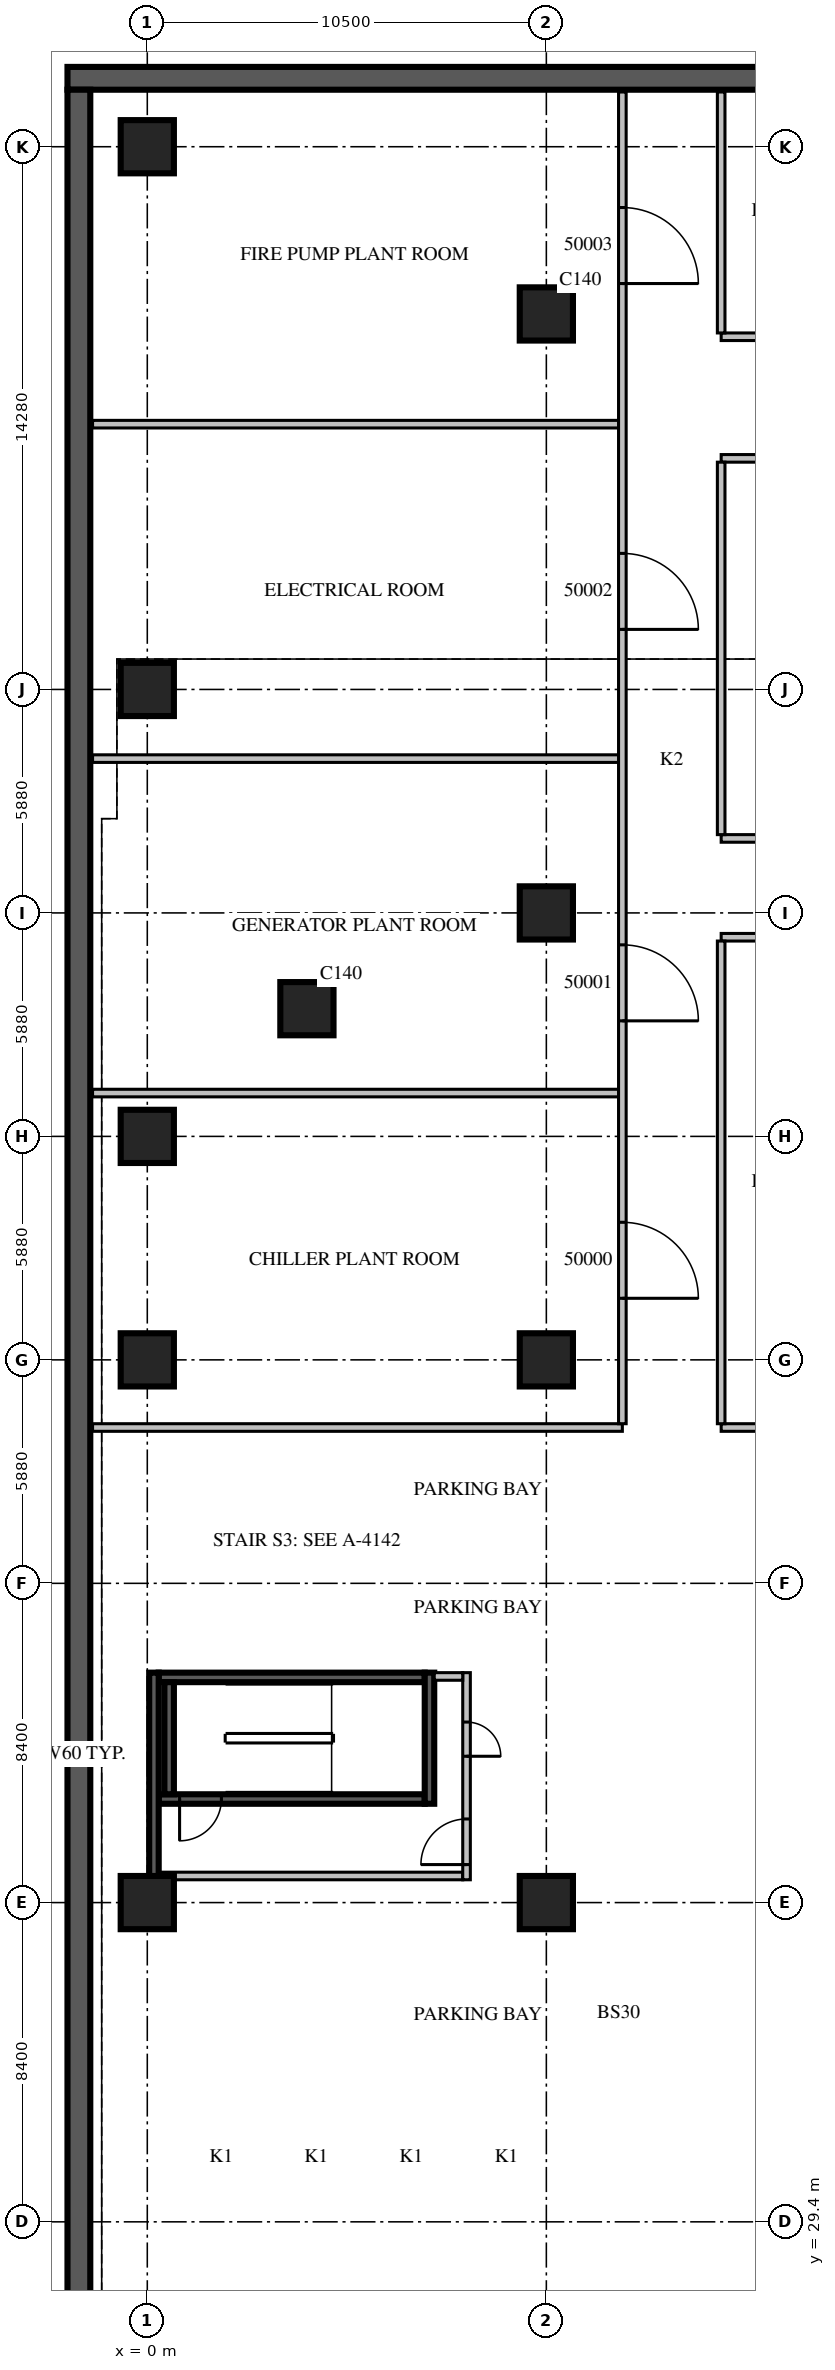
"""IFC4 building model, lengths in metres.
Left out: names, types, materials, properties, quantities, classifications, styles, units other than length and angle.
Written with IfcOpenShell. Run it as: python <this file> out.ifc"""

import sys

from ifc_helpers import new_model, si_unit, direction, frame, frame_2d, origin, origin_2d, place, context, subcontext, project, spatial, rectangle, extrude, source, transform, mapped, element, fill, save


model = new_model("IFC4")
c1 = context("Model", 3, precision=1e-05, world=origin(), true_north=direction((0.0, 1.0)))
c2 = subcontext(c1, "Body", "Model", "MODEL_VIEW")
j1 = project(units=[si_unit("LENGTHUNIT", "METRE"), si_unit("PLANEANGLEUNIT", "RADIAN")], contexts=[c1])
p1 = place(None, origin())
s1 = spatial("IfcSite", under=j1, at=p1, CompositionType="ELEMENT")
p2 = place(p1, origin())
s2 = spatial("IfcBuilding", under=s1, at=p2, CompositionType="ELEMENT")
p3 = place(p2, frame((0.0, 0.0, -13.5)))
s3 = spatial("IfcBuildingStorey", under=s2, at=p3, CompositionType="ELEMENT", Elevation=-13.5)
p4 = place(p3, frame((53.58, 85.8, 0.0), z_axis=(0.0, 0.0, 1.0), x_axis=(-1.0, 0.0, 0.0)))
e1 = element("IfcWall", 1, at=p4, inside=s3, PredefinedType="SOLIDWALL", context=c2, shape_type="SweptSolid", body=[
    extrude(rectangle(XDim=55.68, YDim=0.6, at=frame_2d((27.84, 0.0))), origin(), (0.0, 0.0, 1.0), 4.5),
])
p5 = place(p3, frame((-1.8, 85.5, 0.0), z_axis=(0.0, 0.0, 1.0), x_axis=(0.0, -1.0, 0.0)))
e2 = element("IfcWall", 2, at=p5, inside=s3, PredefinedType="SOLIDWALL", context=c2, shape_type="SweptSolid", body=[
    extrude(rectangle(XDim=87.6, YDim=0.6, at=frame_2d((43.8, 0.0))), origin(), (0.0, 0.0, 1.0), 4.5),
])
m1 = source(origin(), c2, "Body", "SweptSolid", [
    extrude(rectangle(XDim=1.4, YDim=1.4, at=origin_2d()), origin(), (0.0, 0.0, 1.0), 4.5),
])
for number, where, z_axis, x_axis in (
    (3, (0.0, 37.8, 0.0), (0.0, 0.0, 1.0), (1.0, 0.0, 0.0)),
    (4, (0.0, 52.08, 0.0), (0.0, 0.0, 1.0), (1.0, 0.0, 0.0)),
    (5, (0.0, 57.96, 0.0), (0.0, 0.0, 1.0), (1.0, 0.0, 0.0)),
    (6, (0.0, 69.72, 0.0), (0.0, 0.0, 1.0), (1.0, 0.0, 0.0)),
    (7, (0.0, 84.0, 0.0), (0.0, 0.0, 1.0), (1.0, 0.0, 0.0)),
    (8, (4.2, 61.32, 0.0), (0.0, 0.0, 1.0), (1.0, 0.0, 0.0)),
    (9, (10.5, 37.8, 0.0), (0.0, 0.0, 1.0), (1.0, 0.0, 0.0)),
    (10, (10.5, 52.08, 0.0), (0.0, 0.0, 1.0), (1.0, 0.0, 0.0)),
    (11, (10.5, 63.84, 0.0), (0.0, 0.0, 1.0), (1.0, 0.0, 0.0)),
    (12, (10.5, 79.6, 0.0), (0.0, 0.0, 1.0), (1.0, 0.0, 0.0)),
):
    element("IfcColumn", number, at=place(p3, frame(where, z_axis=z_axis, x_axis=x_axis)), inside=s3, PredefinedType="COLUMN", context=c2, shape_type="MappedRepresentation", body=[
        mapped(m1, transform((0.0, 0.0, 0.0), scale=1.0)),
    ])
m2 = source(origin(), c2, "Body", "SweptSolid", [
    extrude(rectangle(XDim=7.0, YDim=0.25, at=frame_2d((3.5, 0.0))), origin(), (0.0, 0.0, 1.0), 3.9),
])
p6 = place(p3, frame((0.3, 40.525, 0.0), z_axis=(0.0, 0.0, 1.0), x_axis=(1.0, 0.0, 0.0)))
e13 = element("IfcWall", 13, at=p6, inside=s3, PredefinedType="SOLIDWALL", context=c2, shape_type="MappedRepresentation", body=[
    mapped(m2, transform((0.0, 0.0, 0.0), scale=1.0)),
])
m3 = source(origin(), c2, "Body", "SweptSolid", [
    extrude(rectangle(XDim=1.1, YDim=2.1, at=frame_2d((0.55, 1.05))), frame((0.0, 0.135, 0.0), z_axis=(0.0, -1.0, 0.0), x_axis=(1.0, 0.0, 0.0)), (0.0, 0.0, 1.0), 0.27),
])
p7 = place(p6, frame((0.55, 0.0, 0.0)))
e14 = element("IfcOpeningElement", 14, at=p7, cuts=e13, PredefinedType="OPENING", context=c2, shape_type="MappedRepresentation", body=[
    mapped(m3, transform((0.0, 0.0, 0.0), scale=1.0)),
])
p8 = place(p3, frame((0.3, 43.725, 0.0), z_axis=(0.0, 0.0, 1.0), x_axis=(1.0, 0.0, 0.0)))
e15 = element("IfcWall", 15, at=p8, inside=s3, PredefinedType="SOLIDWALL", context=c2, shape_type="MappedRepresentation", body=[
    mapped(m2, transform((0.0, 0.0, 0.0), scale=1.0)),
])
m4 = source(origin(), c2, "Body", "SweptSolid", [
    extrude(rectangle(XDim=3.45, YDim=0.25, at=frame_2d((1.725, 0.0))), origin(), (0.0, 0.0, 1.0), 3.9),
])
p9 = place(p3, frame((7.425, 40.4, 0.0), z_axis=(0.0, 0.0, 1.0), x_axis=(0.0, 1.0, 0.0)))
e16 = element("IfcWall", 16, at=p9, inside=s3, PredefinedType="SOLIDWALL", context=c2, shape_type="MappedRepresentation", body=[
    mapped(m4, transform((0.0, 0.0, 0.0), scale=1.0)),
])
m5 = source(origin(), c2, "Body", "SweptSolid", [
    extrude(rectangle(XDim=2.95, YDim=0.25, at=frame_2d((1.475, 0.0))), origin(), (0.0, 0.0, 1.0), 3.9),
])
p10 = place(p3, frame((0.575, 40.65, 0.0), z_axis=(0.0, 0.0, 1.0), x_axis=(0.0, 1.0, 0.0)))
e17 = element("IfcWall", 17, at=p10, inside=s3, PredefinedType="SOLIDWALL", context=c2, shape_type="MappedRepresentation", body=[
    mapped(m5, transform((0.0, 0.0, 0.0), scale=1.0)),
])
m6 = source(origin(), c2, "Body", "SweptSolid", [
    extrude(rectangle(XDim=8.0, YDim=0.2, at=frame_2d((4.0, 0.0))), origin(), (0.0, 0.0, 1.0), 3.9),
])
p11 = place(p3, frame((0.3, 38.5, 0.0), z_axis=(0.0, 0.0, 1.0), x_axis=(1.0, 0.0, 0.0)))
e18 = element("IfcWall", 18, at=p11, inside=s3, PredefinedType="PARTITIONING", context=c2, shape_type="MappedRepresentation", body=[
    mapped(m6, transform((0.0, 0.0, 0.0), scale=1.0)),
])
m7 = source(origin(), c2, "Body", "SweptSolid", [
    extrude(rectangle(XDim=5.45, YDim=0.2, at=frame_2d((2.725, 0.0))), origin(), (0.0, 0.0, 1.0), 3.9),
])
p12 = place(p3, frame((8.4, 38.4, 0.0), z_axis=(0.0, 0.0, 1.0), x_axis=(0.0, 1.0, 0.0)))
e19 = element("IfcWall", 19, at=p12, inside=s3, PredefinedType="PARTITIONING", context=c2, shape_type="MappedRepresentation", body=[
    mapped(m7, transform((0.0, 0.0, 0.0), scale=1.0)),
])
m8 = source(origin(), c2, "Body", "SweptSolid", [
    extrude(rectangle(XDim=1.2, YDim=2.1, at=frame_2d((0.6, 1.05))), frame((0.0, 0.11, 0.0), z_axis=(0.0, -1.0, 0.0), x_axis=(1.0, 0.0, 0.0)), (0.0, 0.0, 1.0), 0.22),
])
p13 = place(p12, frame((0.4, 0.0, 0.0)))
e20 = element("IfcOpeningElement", 20, at=p13, cuts=e19, PredefinedType="OPENING", context=c2, shape_type="MappedRepresentation", body=[
    mapped(m8, transform((0.0, 0.0, 0.0), scale=1.0)),
])
m9 = source(origin(), c2, "Body", "SweptSolid", [
    extrude(rectangle(XDim=0.9, YDim=2.1, at=frame_2d((0.45, 1.05))), frame((0.0, 0.11, 0.0), z_axis=(0.0, -1.0, 0.0), x_axis=(1.0, 0.0, 0.0)), (0.0, 0.0, 1.0), 0.22),
])
p14 = place(p12, frame((3.25, 0.0, 0.0)))
e21 = element("IfcOpeningElement", 21, at=p14, cuts=e19, PredefinedType="OPENING", context=c2, shape_type="MappedRepresentation", body=[
    mapped(m9, transform((0.0, 0.0, 0.0), scale=1.0)),
])
m10 = source(origin(), c2, "Body", "SweptSolid", [
    extrude(rectangle(XDim=0.75, YDim=0.2, at=frame_2d((0.375, 0.0))), origin(), (0.0, 0.0, 1.0), 3.9),
])
p15 = place(p3, frame((7.55, 43.75, 0.0), z_axis=(0.0, 0.0, 1.0), x_axis=(1.0, 0.0, 0.0)))
e22 = element("IfcWall", 22, at=p15, inside=s3, PredefinedType="PARTITIONING", context=c2, shape_type="MappedRepresentation", body=[
    mapped(m10, transform((0.0, 0.0, 0.0), scale=1.0)),
])
m11 = source(origin(), c2, "Body", "SweptSolid", [
    extrude(rectangle(XDim=5.45, YDim=0.25, at=frame_2d((2.725, 0.0))), origin(), (0.0, 0.0, 1.0), 3.9),
])
p16 = place(p3, frame((0.175, 38.4, 0.0), z_axis=(0.0, 0.0, 1.0), x_axis=(0.0, 1.0, 0.0)))
e23 = element("IfcWall", 23, at=p16, inside=s3, PredefinedType="SOLIDWALL", context=c2, shape_type="MappedRepresentation", body=[
    mapped(m11, transform((0.0, 0.0, 0.0), scale=1.0)),
])
p17 = place(p3, frame((-1.44, 50.3, 0.0), z_axis=(0.0, 0.0, 1.0), x_axis=(1.0, 0.0, 0.0)))
e24 = element("IfcWall", 24, at=p17, inside=s3, PredefinedType="PARTITIONING", context=c2, shape_type="SweptSolid", body=[
    extrude(rectangle(XDim=13.94, YDim=0.2, at=frame_2d((6.97, 0.0))), origin(), (0.0, 0.0, 1.0), 3.9),
])
p18 = place(p3, frame((15.1, 50.3, 0.0), z_axis=(0.0, 0.0, 1.0), x_axis=(1.0, 0.0, 0.0)))
e25 = element("IfcWall", 25, at=p18, inside=s3, PredefinedType="PARTITIONING", context=c2, shape_type="SweptSolid", body=[
    extrude(rectangle(XDim=38.48, YDim=0.2, at=frame_2d((19.24, 0.0))), origin(), (0.0, 0.0, 1.0), 3.9),
])
m12 = source(origin(), c2, "Body", "SweptSolid", [
    extrude(rectangle(XDim=13.94, YDim=0.2, at=frame_2d((6.97, 0.0))), origin(), (0.0, 0.0, 1.0), 3.9),
])
p19 = place(p3, frame((-1.44, 59.1, 0.0), z_axis=(0.0, 0.0, 1.0), x_axis=(1.0, 0.0, 0.0)))
e26 = element("IfcWall", 26, at=p19, inside=s3, PredefinedType="PARTITIONING", context=c2, shape_type="MappedRepresentation", body=[
    mapped(m12, transform((0.0, 0.0, 0.0), scale=1.0)),
])
p20 = place(p3, frame((15.1, 63.2, 0.0), z_axis=(0.0, 0.0, 1.0), x_axis=(1.0, 0.0, 0.0)))
e27 = element("IfcWall", 27, at=p20, inside=s3, PredefinedType="PARTITIONING", context=c2, shape_type="SweptSolid", body=[
    extrude(rectangle(XDim=38.42, YDim=0.2, at=frame_2d((19.21, 0.0))), origin(), (0.0, 0.0, 1.0), 3.9),
])
p21 = place(p20, frame((3.2, 0.0, 0.0)))
e28 = element("IfcOpeningElement", 28, at=p21, cuts=e27, PredefinedType="OPENING", context=c2, shape_type="MappedRepresentation", body=[
    mapped(m8, transform((0.0, 0.0, 0.0), scale=1.0)),
])
m13 = source(origin(), c2, "Body", "SweptSolid", [
    extrude(rectangle(XDim=2.0, YDim=2.1, at=frame_2d((1.0, 1.05))), frame((0.0, 0.11, 0.0), z_axis=(0.0, -1.0, 0.0), x_axis=(1.0, 0.0, 0.0)), (0.0, 0.0, 1.0), 0.22),
])
p22 = place(p20, frame((10.5, 0.0, 0.0)))
e29 = element("IfcOpeningElement", 29, at=p22, cuts=e27, PredefinedType="OPENING", context=c2, shape_type="MappedRepresentation", body=[
    mapped(m13, transform((0.0, 0.0, 0.0), scale=1.0)),
])
p23 = place(p20, frame((18.6, 0.0, 0.0)))
e30 = element("IfcOpeningElement", 30, at=p23, cuts=e27, PredefinedType="OPENING", context=c2, shape_type="MappedRepresentation", body=[
    mapped(m13, transform((0.0, 0.0, 0.0), scale=1.0)),
])
p24 = place(p20, frame((26.7, 0.0, 0.0)))
e31 = element("IfcOpeningElement", 31, at=p24, cuts=e27, PredefinedType="OPENING", context=c2, shape_type="MappedRepresentation", body=[
    mapped(m13, transform((0.0, 0.0, 0.0), scale=1.0)),
])
p25 = place(p20, frame((34.4, 0.0, 0.0)))
e32 = element("IfcOpeningElement", 32, at=p25, cuts=e27, PredefinedType="OPENING", context=c2, shape_type="MappedRepresentation", body=[
    mapped(m8, transform((0.0, 0.0, 0.0), scale=1.0)),
])
m14 = source(origin(), c2, "Body", "SweptSolid", [
    extrude(rectangle(XDim=38.42, YDim=0.2, at=frame_2d((19.21, 0.0))), origin(), (0.0, 0.0, 1.0), 3.9),
])
p26 = place(p3, frame((15.1, 65.8, 0.0), z_axis=(0.0, 0.0, 1.0), x_axis=(1.0, 0.0, 0.0)))
e33 = element("IfcWall", 33, at=p26, inside=s3, PredefinedType="PARTITIONING", context=c2, shape_type="MappedRepresentation", body=[
    mapped(m14, transform((0.0, 0.0, 0.0), scale=1.0)),
])
p27 = place(p26, frame((3.2, 0.0, 0.0)))
e34 = element("IfcOpeningElement", 34, at=p27, cuts=e33, PredefinedType="OPENING", context=c2, shape_type="MappedRepresentation", body=[
    mapped(m8, transform((0.0, 0.0, 0.0), scale=1.0)),
])
p28 = place(p26, frame((10.9, 0.0, 0.0)))
e35 = element("IfcOpeningElement", 35, at=p28, cuts=e33, PredefinedType="OPENING", context=c2, shape_type="MappedRepresentation", body=[
    mapped(m8, transform((0.0, 0.0, 0.0), scale=1.0)),
])
p29 = place(p26, frame((19.0, 0.0, 0.0)))
e36 = element("IfcOpeningElement", 36, at=p29, cuts=e33, PredefinedType="OPENING", context=c2, shape_type="MappedRepresentation", body=[
    mapped(m8, transform((0.0, 0.0, 0.0), scale=1.0)),
])
p30 = place(p26, frame((26.7, 0.0, 0.0)))
e37 = element("IfcOpeningElement", 37, at=p30, cuts=e33, PredefinedType="OPENING", context=c2, shape_type="MappedRepresentation", body=[
    mapped(m8, transform((0.0, 0.0, 0.0), scale=1.0)),
])
p31 = place(p26, frame((34.0, 0.0, 0.0)))
e38 = element("IfcOpeningElement", 38, at=p31, cuts=e33, PredefinedType="OPENING", context=c2, shape_type="MappedRepresentation", body=[
    mapped(m8, transform((0.0, 0.0, 0.0), scale=1.0)),
])
p32 = place(p3, frame((-1.44, 67.9, 0.0), z_axis=(0.0, 0.0, 1.0), x_axis=(1.0, 0.0, 0.0)))
e39 = element("IfcWall", 39, at=p32, inside=s3, PredefinedType="PARTITIONING", context=c2, shape_type="MappedRepresentation", body=[
    mapped(m12, transform((0.0, 0.0, 0.0), scale=1.0)),
])
p33 = place(p3, frame((15.1, 75.8, 0.0), z_axis=(0.0, 0.0, 1.0), x_axis=(1.0, 0.0, 0.0)))
e40 = element("IfcWall", 40, at=p33, inside=s3, PredefinedType="PARTITIONING", context=c2, shape_type="MappedRepresentation", body=[
    mapped(m14, transform((0.0, 0.0, 0.0), scale=1.0)),
])
p34 = place(p3, frame((-1.44, 76.7, 0.0), z_axis=(0.0, 0.0, 1.0), x_axis=(1.0, 0.0, 0.0)))
e41 = element("IfcWall", 41, at=p34, inside=s3, PredefinedType="PARTITIONING", context=c2, shape_type="MappedRepresentation", body=[
    mapped(m12, transform((0.0, 0.0, 0.0), scale=1.0)),
])
p35 = place(p3, frame((15.1, 79.0, 0.0), z_axis=(0.0, 0.0, 1.0), x_axis=(1.0, 0.0, 0.0)))
e42 = element("IfcWall", 42, at=p35, inside=s3, PredefinedType="PARTITIONING", context=c2, shape_type="MappedRepresentation", body=[
    mapped(m14, transform((0.0, 0.0, 0.0), scale=1.0)),
])
p36 = place(p35, frame((3.2, 0.0, 0.0)))
e43 = element("IfcOpeningElement", 43, at=p36, cuts=e42, PredefinedType="OPENING", context=c2, shape_type="MappedRepresentation", body=[
    mapped(m8, transform((0.0, 0.0, 0.0), scale=1.0)),
])
p37 = place(p35, frame((11.2, 0.0, 0.0)))
e44 = element("IfcOpeningElement", 44, at=p37, cuts=e42, PredefinedType="OPENING", context=c2, shape_type="MappedRepresentation", body=[
    mapped(m8, transform((0.0, 0.0, 0.0), scale=1.0)),
])
p38 = place(p35, frame((19.3, 0.0, 0.0)))
e45 = element("IfcOpeningElement", 45, at=p38, cuts=e42, PredefinedType="OPENING", context=c2, shape_type="MappedRepresentation", body=[
    mapped(m8, transform((0.0, 0.0, 0.0), scale=1.0)),
])
p39 = place(p35, frame((26.7, 0.0, 0.0)))
e46 = element("IfcOpeningElement", 46, at=p39, cuts=e42, PredefinedType="OPENING", context=c2, shape_type="MappedRepresentation", body=[
    mapped(m8, transform((0.0, 0.0, 0.0), scale=1.0)),
])
p40 = place(p35, frame((34.0, 0.0, 0.0)))
e47 = element("IfcOpeningElement", 47, at=p40, cuts=e42, PredefinedType="OPENING", context=c2, shape_type="MappedRepresentation", body=[
    mapped(m8, transform((0.0, 0.0, 0.0), scale=1.0)),
])
p41 = place(p3, frame((12.5, 50.4, 0.0), z_axis=(0.0, 0.0, 1.0), x_axis=(0.0, 1.0, 0.0)))
e48 = element("IfcWall", 48, at=p41, inside=s3, PredefinedType="PARTITIONING", context=c2, shape_type="SweptSolid", body=[
    extrude(rectangle(XDim=35.04, YDim=0.2, at=frame_2d((17.52, 0.0))), origin(), (0.0, 0.0, 1.0), 3.9),
])
p42 = place(p41, frame((3.3, 0.0, 0.0)))
e49 = element("IfcOpeningElement", 49, at=p42, cuts=e48, PredefinedType="OPENING", context=c2, shape_type="SweptSolid", body=[
    extrude(rectangle(XDim=2.0, YDim=2.1, at=frame_2d((1.0, 1.05))), frame((0.0, 0.11, 0.0), z_axis=(0.0, -1.0, 0.0), x_axis=(1.0, 0.0, 0.0)), (0.0, 0.0, 1.0), 0.22),
])
p43 = place(p41, frame((10.6, 0.0, 0.0)))
e50 = element("IfcOpeningElement", 50, at=p43, cuts=e48, PredefinedType="OPENING", context=c2, shape_type="MappedRepresentation", body=[
    mapped(m13, transform((0.0, 0.0, 0.0), scale=1.0)),
])
p44 = place(p41, frame((20.9, 0.0, 0.0)))
e51 = element("IfcOpeningElement", 51, at=p44, cuts=e48, PredefinedType="OPENING", context=c2, shape_type="MappedRepresentation", body=[
    mapped(m13, transform((0.0, 0.0, 0.0), scale=1.0)),
])
p45 = place(p41, frame((30.0, 0.0, 0.0)))
e52 = element("IfcOpeningElement", 52, at=p45, cuts=e48, PredefinedType="OPENING", context=c2, shape_type="MappedRepresentation", body=[
    mapped(m13, transform((0.0, 0.0, 0.0), scale=1.0)),
])
p46 = place(p3, frame((15.1, 50.4, 0.0), z_axis=(0.0, 0.0, 1.0), x_axis=(0.0, 1.0, 0.0)))
e53 = element("IfcWall", 53, at=p46, inside=s3, PredefinedType="PARTITIONING", context=c2, shape_type="SweptSolid", body=[
    extrude(rectangle(XDim=12.7, YDim=0.2, at=frame_2d((6.35, 0.0))), origin(), (0.0, 0.0, 1.0), 3.9),
])
p47 = place(p3, frame((15.1, 65.9, 0.0), z_axis=(0.0, 0.0, 1.0), x_axis=(0.0, 1.0, 0.0)))
e54 = element("IfcWall", 54, at=p47, inside=s3, PredefinedType="PARTITIONING", context=c2, shape_type="SweptSolid", body=[
    extrude(rectangle(XDim=9.8, YDim=0.2, at=frame_2d((4.9, 0.0))), origin(), (0.0, 0.0, 1.0), 3.9),
])
p48 = place(p3, frame((15.1, 79.1, 0.0), z_axis=(0.0, 0.0, 1.0), x_axis=(0.0, 1.0, 0.0)))
e55 = element("IfcWall", 55, at=p48, inside=s3, PredefinedType="PARTITIONING", context=c2, shape_type="SweptSolid", body=[
    extrude(rectangle(XDim=6.34, YDim=0.2, at=frame_2d((3.17, 0.0))), origin(), (0.0, 0.0, 1.0), 3.9),
])
m15 = source(origin(), c2, "Body", "SweptSolid", [
    extrude(rectangle(XDim=1.1, YDim=2.1, at=frame_2d((0.55, 1.05))), frame((0.0, 0.025, 0.0), z_axis=(0.0, -1.0, 0.0), x_axis=(1.0, 0.0, 0.0)), (0.0, 0.0, 1.0), 0.05),
])
p49 = place(p7, origin())
e56 = element("IfcDoor", 56, at=p49, inside=s3, OperationType="SINGLE_SWING_RIGHT", PredefinedType="DOOR", context=c2, shape_type="MappedRepresentation", body=[
    mapped(m15, transform((0.0, 0.0, 0.0), scale=1.0)),
])
fill(e14, e56)
m16 = source(origin(), c2, "Body", "SweptSolid", [
    extrude(rectangle(XDim=1.2, YDim=2.1, at=frame_2d((0.6, 1.05))), frame((0.0, 0.025, 0.0), z_axis=(0.0, -1.0, 0.0), x_axis=(1.0, 0.0, 0.0)), (0.0, 0.0, 1.0), 0.05),
])
p50 = place(p13, origin())
e57 = element("IfcDoor", 57, at=p50, inside=s3, OperationType="SINGLE_SWING_LEFT", PredefinedType="DOOR", context=c2, shape_type="MappedRepresentation", body=[
    mapped(m16, transform((0.0, 0.0, 0.0), scale=1.0)),
])
fill(e20, e57)
m17 = source(origin(), c2, "Body", "SweptSolid", [
    extrude(rectangle(XDim=0.9, YDim=2.1, at=frame_2d((0.45, 1.05))), frame((0.0, 0.025, 0.0), z_axis=(0.0, -1.0, 0.0), x_axis=(1.0, 0.0, 0.0)), (0.0, 0.0, 1.0), 0.05),
])
p51 = place(p14, origin())
e58 = element("IfcDoor", 58, at=p51, inside=s3, OperationType="SINGLE_SWING_RIGHT", PredefinedType="DOOR", context=c2, shape_type="MappedRepresentation", body=[
    mapped(m17, transform((0.0, 0.0, 0.0), scale=1.0)),
])
fill(e21, e58)
p52 = place(p42, origin())
e59 = element("IfcDoor", 59, at=p52, inside=s3, OperationType="DOUBLE_DOOR_SINGLE_SWING", PredefinedType="DOOR", context=c2, shape_type="SweptSolid", body=[
    extrude(rectangle(XDim=2.0, YDim=2.1, at=frame_2d((1.0, 1.05))), frame((0.0, 0.025, 0.0), z_axis=(0.0, -1.0, 0.0), x_axis=(1.0, 0.0, 0.0)), (0.0, 0.0, 1.0), 0.05),
])
fill(e49, e59)
m18 = source(origin(), c2, "Body", "SweptSolid", [
    extrude(rectangle(XDim=2.0, YDim=2.1, at=frame_2d((1.0, 1.05))), frame((0.0, 0.025, 0.0), z_axis=(0.0, -1.0, 0.0), x_axis=(1.0, 0.0, 0.0)), (0.0, 0.0, 1.0), 0.05),
])
p53 = place(p43, origin())
e60 = element("IfcDoor", 60, at=p53, inside=s3, OperationType="DOUBLE_DOOR_SINGLE_SWING", PredefinedType="DOOR", context=c2, shape_type="MappedRepresentation", body=[
    mapped(m18, transform((0.0, 0.0, 0.0), scale=1.0)),
])
fill(e50, e60)
p54 = place(p44, origin())
e61 = element("IfcDoor", 61, at=p54, inside=s3, OperationType="DOUBLE_DOOR_SINGLE_SWING", PredefinedType="DOOR", context=c2, shape_type="MappedRepresentation", body=[
    mapped(m18, transform((0.0, 0.0, 0.0), scale=1.0)),
])
fill(e51, e61)
p55 = place(p45, origin())
e62 = element("IfcDoor", 62, at=p55, inside=s3, OperationType="DOUBLE_DOOR_SINGLE_SWING", PredefinedType="DOOR", context=c2, shape_type="MappedRepresentation", body=[
    mapped(m18, transform((0.0, 0.0, 0.0), scale=1.0)),
])
fill(e52, e62)
save(model, sys.argv[1])
